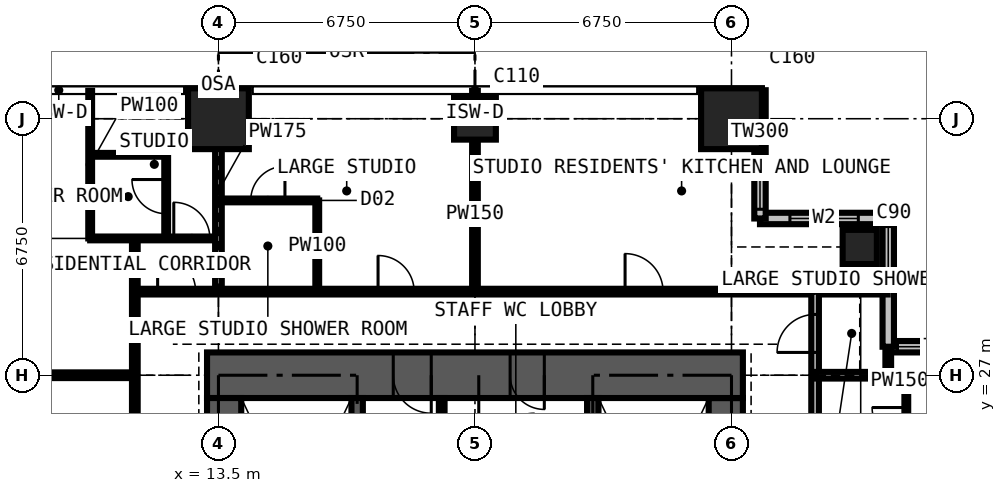
"""IFC4 building model, lengths in metres.
Left out: names, types, materials, properties, quantities, classifications, styles, units other than length and angle.
Written with IfcOpenShell. Run it as: python <this file> out.ifc"""

import sys

from ifc_helpers import new_model, si_unit, direction, frame, frame_2d, origin, origin_2d, place, context, subcontext, project, spatial, rectangle, extrude, element, fill, save


model = new_model("IFC4")
c1 = context("Model", 3, precision=1e-05, world=origin(), true_north=direction((0.0, 1.0)))
c2 = subcontext(c1, "Body", "Model", "MODEL_VIEW")
j1 = project(units=[si_unit("LENGTHUNIT", "METRE"), si_unit("PLANEANGLEUNIT", "RADIAN")], contexts=[c1])
p1 = place(None, origin())
s1 = spatial("IfcSite", under=j1, at=p1, CompositionType="ELEMENT")
p2 = place(p1, origin())
s2 = spatial("IfcBuilding", under=s1, at=p2, CompositionType="ELEMENT")
p3 = place(p2, frame((0.0, 0.0, 207.9)))
s3 = spatial("IfcBuildingStorey", under=s2, at=p3, CompositionType="ELEMENT", Elevation=207.9)
p4 = place(p3, frame((13.5, 33.75, 0.0), z_axis=(0.0, 0.0, 1.0), x_axis=(1.0, 0.0, 0.0)))
e1 = element("IfcColumn", 1, at=p4, inside=s3, PredefinedType="COLUMN", context=c2, shape_type="SweptSolid", body=[
    extrude(rectangle(XDim=1.6, YDim=1.6, at=origin_2d()), origin(), (0.0, 0.0, 1.0), 3.6),
])
p5 = place(p3, frame((20.25, 33.75, 0.0), z_axis=(0.0, 0.0, 1.0), x_axis=(1.0, 0.0, 0.0)))
e2 = element("IfcColumn", 2, at=p5, inside=s3, PredefinedType="COLUMN", context=c2, shape_type="SweptSolid", body=[
    extrude(rectangle(XDim=1.1, YDim=1.1, at=origin_2d()), origin(), (0.0, 0.0, 1.0), 3.6),
])
p6 = place(p3, frame((27.0, 33.75, 0.0), z_axis=(0.0, 0.0, 1.0), x_axis=(1.0, 0.0, 0.0)))
e3 = element("IfcColumn", 3, at=p6, inside=s3, PredefinedType="COLUMN", context=c2, shape_type="SweptSolid", body=[
    extrude(rectangle(XDim=1.6, YDim=1.6, at=origin_2d()), origin(), (0.0, 0.0, 1.0), 3.6),
])
p7 = place(p3, frame((30.375, 30.375, 0.0), z_axis=(0.0, 0.0, 1.0), x_axis=(1.0, 0.0, 0.0)))
e4 = element("IfcColumn", 4, at=p7, inside=s3, PredefinedType="COLUMN", context=c2, shape_type="SweptSolid", body=[
    extrude(rectangle(XDim=0.9, YDim=0.9, at=origin_2d()), origin(), (0.0, 0.0, 1.0), 3.6),
])
p8 = place(p3, frame((26.85, 14.1, 0.0), z_axis=(0.0, 0.0, 1.0), x_axis=(0.0, 1.0, 0.0)))
e5 = element("IfcWall", 5, at=p8, inside=s3, PredefinedType="SHEAR", context=c2, shape_type="SweptSolid", body=[
    extrude(rectangle(XDim=12.3, YDim=0.9, at=frame_2d((6.15, 0.0))), origin(), (0.0, 0.0, 1.0), 3.6),
])
p9 = place(p8, frame((3.65, 0.0, 0.0)))
e6 = element("IfcOpeningElement", 6, at=p9, cuts=e5, PredefinedType="OPENING", context=c2, shape_type="SweptSolid", body=[
    extrude(rectangle(XDim=1.2, YDim=2.2, at=frame_2d((0.6, 1.1))), frame((0.0, 0.46, 0.0), z_axis=(0.0, -1.0, 0.0), x_axis=(1.0, 0.0, 0.0)), (0.0, 0.0, 1.0), 0.92),
])
p10 = place(p3, frame((27.3, 27.0, 0.0), z_axis=(0.0, 0.0, 1.0), x_axis=(-1.0, 0.0, 0.0)))
e7 = element("IfcWall", 7, at=p10, inside=s3, PredefinedType="SHEAR", context=c2, shape_type="SweptSolid", body=[
    extrude(rectangle(XDim=14.1, YDim=1.2, at=frame_2d((7.05, 0.0))), origin(), (0.0, 0.0, 1.0), 3.6),
])
p11 = place(p10, frame((5.225, 0.0, 0.0)))
e8 = element("IfcOpeningElement", 8, at=p11, cuts=e7, PredefinedType="OPENING", context=c2, shape_type="SweptSolid", body=[
    extrude(rectangle(XDim=0.9, YDim=2.2, at=frame_2d((0.45, 1.1))), frame((0.0, 0.61, 0.0), z_axis=(0.0, -1.0, 0.0), x_axis=(1.0, 0.0, 0.0)), (0.0, 0.0, 1.0), 1.22),
])
p12 = place(p10, frame((8.2, 0.0, 0.0)))
e9 = element("IfcOpeningElement", 9, at=p12, cuts=e7, PredefinedType="OPENING", context=c2, shape_type="SweptSolid", body=[
    extrude(rectangle(XDim=1.0, YDim=2.2, at=frame_2d((0.5, 1.1))), frame((0.0, 0.61, 0.0), z_axis=(0.0, -1.0, 0.0), x_axis=(1.0, 0.0, 0.0)), (0.0, 0.0, 1.0), 1.22),
])
p13 = place(p3, frame((13.65, 26.4, 0.0), z_axis=(0.0, 0.0, 1.0), x_axis=(0.0, -1.0, 0.0)))
e10 = element("IfcWall", 10, at=p13, inside=s3, PredefinedType="SHEAR", context=c2, shape_type="SweptSolid", body=[
    extrude(rectangle(XDim=12.3, YDim=0.9, at=frame_2d((6.15, 0.0))), origin(), (0.0, 0.0, 1.0), 3.6),
])
p14 = place(p13, frame((7.45, 0.0, 0.0)))
e11 = element("IfcOpeningElement", 11, at=p14, cuts=e10, PredefinedType="OPENING", context=c2, shape_type="SweptSolid", body=[
    extrude(rectangle(XDim=1.2, YDim=2.2, at=frame_2d((0.6, 1.1))), frame((0.0, 0.46, 0.0), z_axis=(0.0, -1.0, 0.0), x_axis=(1.0, 0.0, 0.0)), (0.0, 0.0, 1.0), 0.92),
])
p15 = place(p3, frame((34.5, 27.75, 0.0), z_axis=(0.0, 0.0, 1.0), x_axis=(-1.0, 0.0, 0.0)))
e12 = element("IfcWall", 12, at=p15, inside=s3, PredefinedType="SOLIDWALL", context=c2, shape_type="SweptSolid", body=[
    extrude(rectangle(XDim=3.375, YDim=0.3, at=frame_2d((1.688, 0.0))), origin(), (0.0, 0.0, 1.0), 3.375),
])
p16 = place(p15, frame((1.633, 0.0, 0.9)))
e13 = element("IfcOpeningElement", 13, at=p16, cuts=e12, PredefinedType="OPENING", context=c2, shape_type="SweptSolid", body=[
    extrude(rectangle(XDim=1.5, YDim=1.8, at=frame_2d((0.75, 0.9))), frame((0.0, 0.16, 0.0), z_axis=(0.0, -1.0, 0.0), x_axis=(1.0, 0.0, 0.0)), (0.0, 0.0, 1.0), 0.32),
])
p17 = place(p3, frame((31.125, 27.75, 0.0), z_axis=(0.0, 0.0, 1.0), x_axis=(0.0, 1.0, 0.0)))
e14 = element("IfcWall", 14, at=p17, inside=s3, PredefinedType="SOLIDWALL", context=c2, shape_type="SweptSolid", body=[
    extrude(rectangle(XDim=3.375, YDim=0.3, at=frame_2d((1.688, 0.0))), origin(), (0.0, 0.0, 1.0), 3.375),
])
p18 = place(p17, frame((1.663, 0.0, 0.9)))
e15 = element("IfcOpeningElement", 15, at=p18, cuts=e14, PredefinedType="OPENING", context=c2, shape_type="SweptSolid", body=[
    extrude(rectangle(XDim=1.5, YDim=1.8, at=frame_2d((0.75, 0.9))), frame((0.0, 0.16, 0.0), z_axis=(0.0, -1.0, 0.0), x_axis=(1.0, 0.0, 0.0)), (0.0, 0.0, 1.0), 0.32),
])
p19 = place(p3, frame((31.125, 31.125, 0.0), z_axis=(0.0, 0.0, 1.0), x_axis=(-1.0, 0.0, 0.0)))
e16 = element("IfcWall", 16, at=p19, inside=s3, PredefinedType="SOLIDWALL", context=c2, shape_type="SweptSolid", body=[
    extrude(rectangle(XDim=3.375, YDim=0.3, at=frame_2d((1.688, 0.0))), origin(), (0.0, 0.0, 1.0), 3.375),
])
p20 = place(p19, frame((0.788, 0.0, 0.6)))
e17 = element("IfcOpeningElement", 17, at=p20, cuts=e16, PredefinedType="OPENING", context=c2, shape_type="SweptSolid", body=[
    extrude(rectangle(XDim=1.8, YDim=2.1, at=frame_2d((0.9, 1.05))), frame((0.0, 0.16, 0.0), z_axis=(0.0, -1.0, 0.0), x_axis=(1.0, 0.0, 0.0)), (0.0, 0.0, 1.0), 0.32),
])
p21 = place(p3, frame((27.75, 31.125, 0.0), z_axis=(0.0, 0.0, 1.0), x_axis=(0.0, 1.0, 0.0)))
e18 = element("IfcWall", 18, at=p21, inside=s3, PredefinedType="SOLIDWALL", context=c2, shape_type="SweptSolid", body=[
    extrude(rectangle(XDim=3.375, YDim=0.3, at=frame_2d((1.688, 0.0))), origin(), (0.0, 0.0, 1.0), 3.375),
])
p22 = place(p21, frame((0.242, 0.0, 0.9)))
e19 = element("IfcOpeningElement", 19, at=p22, cuts=e18, PredefinedType="OPENING", context=c2, shape_type="SweptSolid", body=[
    extrude(rectangle(XDim=1.5, YDim=1.8, at=frame_2d((0.75, 0.9))), frame((0.0, 0.16, 0.0), z_axis=(0.0, -1.0, 0.0), x_axis=(1.0, 0.0, 0.0)), (0.0, 0.0, 1.0), 0.32),
])
for number, where, z_axis, x_axis in (
    (20, (17.15, 20.3, 0.0), (0.0, 0.0, 1.0), (0.0, 1.0, 0.0)),
    (21, (23.35, 20.3, 0.0), (0.0, 0.0, 1.0), (0.0, 1.0, 0.0)),
):
    element("IfcWall", number, at=place(p3, frame(where, z_axis=z_axis, x_axis=x_axis)), inside=s3, PredefinedType="SHEAR", context=c2, shape_type="SweptSolid", body=[
        extrude(rectangle(XDim=6.1, YDim=0.3, at=frame_2d((3.05, 0.0))), origin(), (0.0, 0.0, 1.0), 3.6),
    ])
p23 = place(p3, frame((19.375, 23.4, 0.0), z_axis=(0.0, 0.0, 1.0), x_axis=(0.0, 1.0, 0.0)))
e22 = element("IfcWall", 22, at=p23, inside=s3, PredefinedType="PARTITIONING", context=c2, shape_type="SweptSolid", body=[
    extrude(rectangle(XDim=3.0, YDim=0.15, at=frame_2d((1.5, 0.0))), origin(), (0.0, 0.0, 1.0), 3.375),
])
p24 = place(p3, frame((-0.734, 27.0, 0.0), z_axis=(0.0, 0.0, 1.0), x_axis=(1.0, 0.0, 0.0)))
e23 = element("IfcWall", 23, at=p24, inside=s3, PredefinedType="PARTITIONING", context=c2, shape_type="SweptSolid", body=[
    extrude(rectangle(XDim=12.034, YDim=0.15, at=frame_2d((6.017, 0.0))), origin(), (0.0, 0.0, 1.0), 2.877),
])
p25 = place(p24, frame((8.184, 0.0, 0.0)))
e24 = element("IfcOpeningElement", 24, at=p25, cuts=e23, PredefinedType="OPENING", context=c2, shape_type="SweptSolid", body=[
    extrude(rectangle(XDim=1.0, YDim=2.2, at=frame_2d((0.5, 1.1))), frame((0.0, 0.085, 0.0), z_axis=(0.0, -1.0, 0.0), x_axis=(1.0, 0.0, 0.0)), (0.0, 0.0, 1.0), 0.17),
])
p26 = place(p3, frame((10.125, 30.6, 0.0), z_axis=(0.0, 0.0, 1.0), x_axis=(0.0, 1.0, 0.0)))
e25 = element("IfcWall", 25, at=p26, inside=s3, PredefinedType="PARTITIONING", context=c2, shape_type="SweptSolid", body=[
    extrude(rectangle(XDim=3.884, YDim=0.1, at=frame_2d((1.942, 0.0))), origin(), (0.0, 0.0, 1.0), 3.375),
])
p27 = place(p3, frame((10.125, 30.6, 0.0), z_axis=(0.0, 0.0, 1.0), x_axis=(1.0, 0.0, 0.0)))
e26 = element("IfcWall", 26, at=p27, inside=s3, PredefinedType="PARTITIONING", context=c2, shape_type="SweptSolid", body=[
    extrude(rectangle(XDim=3.375, YDim=0.1, at=frame_2d((1.688, 0.0))), origin(), (0.0, 0.0, 1.0), 3.375),
])
p28 = place(p27, frame((2.2, 0.0, 0.0)))
e27 = element("IfcOpeningElement", 27, at=p28, cuts=e26, PredefinedType="OPENING", context=c2, shape_type="SweptSolid", body=[
    extrude(rectangle(XDim=0.95, YDim=2.2, at=frame_2d((0.475, 1.1))), frame((0.0, 0.06, 0.0), z_axis=(0.0, -1.0, 0.0), x_axis=(1.0, 0.0, 0.0)), (0.0, 0.0, 1.0), 0.12),
])
p29 = place(p3, frame((10.125, 32.8, 0.0), z_axis=(0.0, 0.0, 1.0), x_axis=(1.0, 0.0, 0.0)))
e28 = element("IfcWall", 28, at=p29, inside=s3, PredefinedType="PARTITIONING", context=c2, shape_type="SweptSolid", body=[
    extrude(rectangle(XDim=2.0, YDim=0.1, at=frame_2d((1.0, 0.0))), origin(), (0.0, 0.0, 1.0), 3.375),
])
p30 = place(p3, frame((11.3, 11.3, 0.0), z_axis=(0.0, 0.0, 1.0), x_axis=(0.0, 1.0, 0.0)))
e29 = element("IfcWall", 29, at=p30, inside=s3, PredefinedType="PARTITIONING", context=c2, shape_type="SweptSolid", body=[
    extrude(rectangle(XDim=19.3, YDim=0.15, at=frame_2d((9.65, 0.0))), origin(), (0.0, 0.0, 1.0), 3.375),
])
p31 = place(p30, frame((13.525, 0.0, 0.0)))
e30 = element("IfcOpeningElement", 30, at=p31, cuts=e29, PredefinedType="OPENING", context=c2, shape_type="SweptSolid", body=[
    extrude(rectangle(XDim=1.0, YDim=2.2, at=frame_2d((0.5, 1.1))), frame((0.0, 0.085, 0.0), z_axis=(0.0, -1.0, 0.0), x_axis=(1.0, 0.0, 0.0)), (0.0, 0.0, 1.0), 0.17),
])
p32 = place(p30, frame((10.438, 0.0, 0.0)))
e31 = element("IfcOpeningElement", 31, at=p32, cuts=e29, PredefinedType="OPENING", context=c2, shape_type="SweptSolid", body=[
    extrude(rectangle(XDim=1.0, YDim=2.2, at=frame_2d((0.5, 1.1))), frame((0.0, 0.085, 0.0), z_axis=(0.0, -1.0, 0.0), x_axis=(1.0, 0.0, 0.0)), (0.0, 0.0, 1.0), 0.17),
])
p33 = place(p3, frame((11.3, 29.2, 0.0), z_axis=(0.0, 0.0, 1.0), x_axis=(1.0, 0.0, 0.0)))
e32 = element("IfcWall", 32, at=p33, inside=s3, PredefinedType="PARTITIONING", context=c2, shape_type="SweptSolid", body=[
    extrude(rectangle(XDim=19.809, YDim=0.15, at=frame_2d((9.904, 0.0))), origin(), (0.0, 0.0, 1.0), 3.375),
])
p34 = place(p33, frame((12.9, 0.0, 0.0)))
e33 = element("IfcOpeningElement", 33, at=p34, cuts=e32, PredefinedType="OPENING", context=c2, shape_type="SweptSolid", body=[
    extrude(rectangle(XDim=1.0, YDim=2.2, at=frame_2d((0.5, 1.1))), frame((0.0, 0.085, 0.0), z_axis=(0.0, -1.0, 0.0), x_axis=(1.0, 0.0, 0.0)), (0.0, 0.0, 1.0), 0.17),
])
p35 = place(p33, frame((6.4, 0.0, 0.0)))
e34 = element("IfcOpeningElement", 34, at=p35, cuts=e32, PredefinedType="OPENING", context=c2, shape_type="SweptSolid", body=[
    extrude(rectangle(XDim=0.95, YDim=2.2, at=frame_2d((0.475, 1.1))), frame((0.0, 0.085, 0.0), z_axis=(0.0, -1.0, 0.0), x_axis=(1.0, 0.0, 0.0)), (0.0, 0.0, 1.0), 0.17),
])
p36 = place(p33, frame((0.6, 0.0, 0.0)))
e35 = element("IfcOpeningElement", 35, at=p36, cuts=e32, PredefinedType="OPENING", context=c2, shape_type="SweptSolid", body=[
    extrude(rectangle(XDim=1.0, YDim=2.2, at=frame_2d((0.5, 1.1))), frame((0.0, 0.085, 0.0), z_axis=(0.0, -1.0, 0.0), x_axis=(1.0, 0.0, 0.0)), (0.0, 0.0, 1.0), 0.17),
])
p37 = place(p3, frame((12.125, 30.6, 0.0), z_axis=(0.0, 0.0, 1.0), x_axis=(0.0, 1.0, 0.0)))
e36 = element("IfcWall", 36, at=p37, inside=s3, PredefinedType="PARTITIONING", context=c2, shape_type="SweptSolid", body=[
    extrude(rectangle(XDim=2.2, YDim=0.1, at=frame_2d((1.1, 0.0))), origin(), (0.0, 0.0, 1.0), 3.375),
])
p38 = place(p37, frame((0.65, 0.0, 0.0)))
e37 = element("IfcOpeningElement", 37, at=p38, cuts=e36, PredefinedType="OPENING", context=c2, shape_type="SweptSolid", body=[
    extrude(rectangle(XDim=0.9, YDim=2.2, at=frame_2d((0.45, 1.1))), frame((0.0, 0.06, 0.0), z_axis=(0.0, -1.0, 0.0), x_axis=(1.0, 0.0, 0.0)), (0.0, 0.0, 1.0), 0.12),
])
p39 = place(p3, frame((13.5, 29.2, 0.0), z_axis=(0.0, 0.0, 1.0), x_axis=(0.0, 1.0, 0.0)))
e38 = element("IfcWall", 38, at=p39, inside=s3, PredefinedType="PARTITIONING", context=c2, shape_type="SweptSolid", body=[
    extrude(rectangle(XDim=5.284, YDim=0.175, at=frame_2d((2.642, 0.0))), origin(), (0.0, 0.0, 1.0), 2.61),
])
p40 = place(p3, frame((13.5, 31.6, 0.0), z_axis=(0.0, 0.0, 1.0), x_axis=(1.0, 0.0, 0.0)))
e39 = element("IfcWall", 39, at=p40, inside=s3, PredefinedType="PARTITIONING", context=c2, shape_type="SweptSolid", body=[
    extrude(rectangle(XDim=2.6, YDim=0.1, at=frame_2d((1.3, 0.0))), origin(), (0.0, 0.0, 1.0), 3.375),
])
p41 = place(p40, frame((0.85, 0.0, 0.0)))
e40 = element("IfcOpeningElement", 40, at=p41, cuts=e39, PredefinedType="OPENING", context=c2, shape_type="SweptSolid", body=[
    extrude(rectangle(XDim=0.9, YDim=2.2, at=frame_2d((0.45, 1.1))), frame((0.0, 0.06, 0.0), z_axis=(0.0, -1.0, 0.0), x_axis=(1.0, 0.0, 0.0)), (0.0, 0.0, 1.0), 0.12),
])
p42 = place(p3, frame((16.1, 29.2, 0.0), z_axis=(0.0, 0.0, 1.0), x_axis=(0.0, 1.0, 0.0)))
e41 = element("IfcWall", 41, at=p42, inside=s3, PredefinedType="PARTITIONING", context=c2, shape_type="SweptSolid", body=[
    extrude(rectangle(XDim=2.4, YDim=0.1, at=frame_2d((1.2, 0.0))), origin(), (0.0, 0.0, 1.0), 3.375),
])
p43 = place(p3, frame((20.25, 29.2, 0.0), z_axis=(0.0, 0.0, 1.0), x_axis=(0.0, 1.0, 0.0)))
e42 = element("IfcWall", 42, at=p43, inside=s3, PredefinedType="PARTITIONING", context=c2, shape_type="SweptSolid", body=[
    extrude(rectangle(XDim=5.284, YDim=0.15, at=frame_2d((2.642, 0.0))), origin(), (0.0, 0.0, 1.0), 2.61),
])
p44 = place(p3, frame((29.2, 11.3, 0.0), z_axis=(0.0, 0.0, 1.0), x_axis=(0.0, 1.0, 0.0)))
e43 = element("IfcWall", 43, at=p44, inside=s3, PredefinedType="PARTITIONING", context=c2, shape_type="SweptSolid", body=[
    extrude(rectangle(XDim=17.9, YDim=0.2, at=frame_2d((8.95, 0.0))), origin(), (0.0, 0.0, 1.0), 3.375),
])
p45 = place(p44, frame((2.3, 0.0, 0.0)))
e44 = element("IfcOpeningElement", 44, at=p45, cuts=e43, PredefinedType="OPENING", context=c2, shape_type="SweptSolid", body=[
    extrude(rectangle(XDim=1.0, YDim=2.2, at=frame_2d((0.5, 1.1))), frame((0.0, 0.11, 0.0), z_axis=(0.0, -1.0, 0.0), x_axis=(1.0, 0.0, 0.0)), (0.0, 0.0, 1.0), 0.22),
])
p46 = place(p44, frame((10.55, 0.0, 0.0)))
e45 = element("IfcOpeningElement", 45, at=p46, cuts=e43, PredefinedType="OPENING", context=c2, shape_type="SweptSolid", body=[
    extrude(rectangle(XDim=0.95, YDim=2.2, at=frame_2d((0.475, 1.1))), frame((0.0, 0.11, 0.0), z_axis=(0.0, -1.0, 0.0), x_axis=(1.0, 0.0, 0.0)), (0.0, 0.0, 1.0), 0.22),
])
p47 = place(p44, frame((5.775, 0.0, 0.0)))
e46 = element("IfcOpeningElement", 46, at=p47, cuts=e43, PredefinedType="OPENING", context=c2, shape_type="SweptSolid", body=[
    extrude(rectangle(XDim=0.95, YDim=2.2, at=frame_2d((0.475, 1.1))), frame((0.0, 0.11, 0.0), z_axis=(0.0, -1.0, 0.0), x_axis=(1.0, 0.0, 0.0)), (0.0, 0.0, 1.0), 0.22),
])
p48 = place(p44, frame((16.3, 0.0, 0.0)))
e47 = element("IfcOpeningElement", 47, at=p48, cuts=e43, PredefinedType="OPENING", context=c2, shape_type="SweptSolid", body=[
    extrude(rectangle(XDim=1.0, YDim=2.2, at=frame_2d((0.5, 1.1))), frame((0.0, 0.11, 0.0), z_axis=(0.0, -1.0, 0.0), x_axis=(1.0, 0.0, 0.0)), (0.0, 0.0, 1.0), 0.22),
])
p49 = place(p3, frame((29.2, 27.0, 0.0), z_axis=(0.0, 0.0, 1.0), x_axis=(1.0, 0.0, 0.0)))
e48 = element("IfcWall", 48, at=p49, inside=s3, PredefinedType="PARTITIONING", context=c2, shape_type="SweptSolid", body=[
    extrude(rectangle(XDim=5.284, YDim=0.175, at=frame_2d((2.642, 0.0))), origin(), (0.0, 0.0, 1.0), 2.877),
])
p50 = place(p3, frame((31.125, 27.0, 0.0), z_axis=(0.0, 0.0, 1.0), x_axis=(0.0, 1.0, 0.0)))
e49 = element("IfcWall", 49, at=p50, inside=s3, PredefinedType="PARTITIONING", context=c2, shape_type="SweptSolid", body=[
    extrude(rectangle(XDim=0.734, YDim=0.15, at=frame_2d((0.367, 0.0))), origin(), (0.0, 0.0, 1.0), 3.375),
])
p51 = place(p3, frame((31.6, 24.4, 0.0), z_axis=(0.0, 0.0, 1.0), x_axis=(0.0, 1.0, 0.0)))
e50 = element("IfcWall", 50, at=p51, inside=s3, PredefinedType="PARTITIONING", context=c2, shape_type="SweptSolid", body=[
    extrude(rectangle(XDim=2.6, YDim=0.1, at=frame_2d((1.3, 0.0))), origin(), (0.0, 0.0, 1.0), 3.375),
])
p52 = place(p51, frame((0.85, 0.0, 0.0)))
e51 = element("IfcOpeningElement", 51, at=p52, cuts=e50, PredefinedType="OPENING", context=c2, shape_type="SweptSolid", body=[
    extrude(rectangle(XDim=0.9, YDim=2.2, at=frame_2d((0.45, 1.1))), frame((0.0, 0.06, 0.0), z_axis=(0.0, -1.0, 0.0), x_axis=(1.0, 0.0, 0.0)), (0.0, 0.0, 1.0), 0.12),
])
p53 = place(p16, origin())
e52 = element("IfcWindow", 52, at=p53, inside=s3, PartitioningType="SINGLE_PANEL", PredefinedType="WINDOW", context=c2, shape_type="SweptSolid", body=[
    extrude(rectangle(XDim=1.5, YDim=1.8, at=frame_2d((0.75, 0.9))), frame((0.0, 0.03, 0.0), z_axis=(0.0, -1.0, 0.0), x_axis=(1.0, 0.0, 0.0)), (0.0, 0.0, 1.0), 0.06),
])
fill(e13, e52)
p54 = place(p18, origin())
e53 = element("IfcWindow", 53, at=p54, inside=s3, PartitioningType="SINGLE_PANEL", PredefinedType="WINDOW", context=c2, shape_type="SweptSolid", body=[
    extrude(rectangle(XDim=1.5, YDim=1.8, at=frame_2d((0.75, 0.9))), frame((0.0, 0.03, 0.0), z_axis=(0.0, -1.0, 0.0), x_axis=(1.0, 0.0, 0.0)), (0.0, 0.0, 1.0), 0.06),
])
fill(e15, e53)
p55 = place(p20, origin())
e54 = element("IfcWindow", 54, at=p55, inside=s3, PartitioningType="SINGLE_PANEL", PredefinedType="WINDOW", context=c2, shape_type="SweptSolid", body=[
    extrude(rectangle(XDim=1.8, YDim=2.1, at=frame_2d((0.9, 1.05))), frame((0.0, 0.03, 0.0), z_axis=(0.0, -1.0, 0.0), x_axis=(1.0, 0.0, 0.0)), (0.0, 0.0, 1.0), 0.06),
])
fill(e17, e54)
p56 = place(p22, origin())
e55 = element("IfcWindow", 55, at=p56, inside=s3, PartitioningType="SINGLE_PANEL", PredefinedType="WINDOW", context=c2, shape_type="SweptSolid", body=[
    extrude(rectangle(XDim=1.5, YDim=1.8, at=frame_2d((0.75, 0.9))), frame((0.0, 0.03, 0.0), z_axis=(0.0, -1.0, 0.0), x_axis=(1.0, 0.0, 0.0)), (0.0, 0.0, 1.0), 0.06),
])
fill(e19, e55)
p57 = place(p11, origin())
e56 = element("IfcDoor", 56, at=p57, inside=s3, OperationType="SINGLE_SWING_LEFT", PredefinedType="DOOR", context=c2, shape_type="SweptSolid", body=[
    extrude(rectangle(XDim=0.9, YDim=2.2, at=frame_2d((0.45, 1.1))), frame((0.0, 0.4, 0.0), z_axis=(0.0, -1.0, 0.0), x_axis=(1.0, 0.0, 0.0)), (0.0, 0.0, 1.0), 0.8),
])
fill(e8, e56)
p58 = place(p12, origin())
e57 = element("IfcDoor", 57, at=p58, inside=s3, OperationType="SINGLE_SWING_LEFT", PredefinedType="DOOR", context=c2, shape_type="SweptSolid", body=[
    extrude(rectangle(XDim=1.0, YDim=2.2, at=frame_2d((0.5, 1.1))), frame((0.0, 0.025, 0.0), z_axis=(0.0, -1.0, 0.0), x_axis=(1.0, 0.0, 0.0)), (0.0, 0.0, 1.0), 0.05),
])
fill(e9, e57)
p59 = place(p52, origin())
e58 = element("IfcDoor", 58, at=p59, inside=s3, OperationType="SINGLE_SWING_RIGHT", PredefinedType="DOOR", context=c2, shape_type="SweptSolid", body=[
    extrude(rectangle(XDim=0.9, YDim=2.2, at=frame_2d((0.45, 1.1))), frame((0.0, 0.025, 0.0), z_axis=(0.0, -1.0, 0.0), x_axis=(1.0, 0.0, 0.0)), (0.0, 0.0, 1.0), 0.05),
])
fill(e51, e58)
p60 = place(p48, origin())
e59 = element("IfcDoor", 59, at=p60, inside=s3, OperationType="SINGLE_SWING_LEFT", PredefinedType="DOOR", context=c2, shape_type="SweptSolid", body=[
    extrude(rectangle(XDim=1.0, YDim=2.2, at=frame_2d((0.5, 1.1))), frame((0.0, 0.025, 0.0), z_axis=(0.0, -1.0, 0.0), x_axis=(1.0, 0.0, 0.0)), (0.0, 0.0, 1.0), 0.05),
])
fill(e47, e59)
p61 = place(p34, origin())
e60 = element("IfcDoor", 60, at=p61, inside=s3, OperationType="SINGLE_SWING_LEFT", PredefinedType="DOOR", context=c2, shape_type="SweptSolid", body=[
    extrude(rectangle(XDim=1.0, YDim=2.2, at=frame_2d((0.5, 1.1))), frame((0.0, 0.025, 0.0), z_axis=(0.0, -1.0, 0.0), x_axis=(1.0, 0.0, 0.0)), (0.0, 0.0, 1.0), 0.05),
])
fill(e33, e60)
p62 = place(p35, origin())
e61 = element("IfcDoor", 61, at=p62, inside=s3, OperationType="SINGLE_SWING_LEFT", PredefinedType="DOOR", context=c2, shape_type="SweptSolid", body=[
    extrude(rectangle(XDim=0.95, YDim=2.2, at=frame_2d((0.475, 1.1))), frame((0.0, 0.025, 0.0), z_axis=(0.0, -1.0, 0.0), x_axis=(1.0, 0.0, 0.0)), (0.0, 0.0, 1.0), 0.05),
])
fill(e34, e61)
p63 = place(p41, origin())
e62 = element("IfcDoor", 62, at=p63, inside=s3, OperationType="SINGLE_SWING_RIGHT", PredefinedType="DOOR", context=c2, shape_type="SweptSolid", body=[
    extrude(rectangle(XDim=0.9, YDim=2.2, at=frame_2d((0.45, 1.1))), frame((0.0, 0.025, 0.0), z_axis=(0.0, -1.0, 0.0), x_axis=(1.0, 0.0, 0.0)), (0.0, 0.0, 1.0), 0.05),
])
fill(e40, e62)
p64 = place(p28, origin())
e63 = element("IfcDoor", 63, at=p64, inside=s3, OperationType="SINGLE_SWING_LEFT", PredefinedType="DOOR", context=c2, shape_type="SweptSolid", body=[
    extrude(rectangle(XDim=0.95, YDim=2.2, at=frame_2d((0.475, 1.1))), frame((0.0, 0.025, 0.0), z_axis=(0.0, -1.0, 0.0), x_axis=(1.0, 0.0, 0.0)), (0.0, 0.0, 1.0), 0.05),
])
fill(e27, e63)
p65 = place(p38, origin())
e64 = element("IfcDoor", 64, at=p65, inside=s3, OperationType="SINGLE_SWING_RIGHT", PredefinedType="DOOR", context=c2, shape_type="SweptSolid", body=[
    extrude(rectangle(XDim=0.9, YDim=2.2, at=frame_2d((0.45, 1.1))), frame((0.0, 0.025, 0.0), z_axis=(0.0, -1.0, 0.0), x_axis=(1.0, 0.0, 0.0)), (0.0, 0.0, 1.0), 0.05),
])
fill(e37, e64)
p66 = place(p36, origin())
e65 = element("IfcDoor", 65, at=p66, inside=s3, OperationType="SINGLE_SWING_LEFT", PredefinedType="DOOR", context=c2, shape_type="SweptSolid", body=[
    extrude(rectangle(XDim=1.0, YDim=2.2, at=frame_2d((0.5, 1.1))), frame((0.0, 0.025, 0.0), z_axis=(0.0, -1.0, 0.0), x_axis=(1.0, 0.0, 0.0)), (0.0, 0.0, 1.0), 0.05),
])
fill(e35, e65)
save(model, sys.argv[1])
